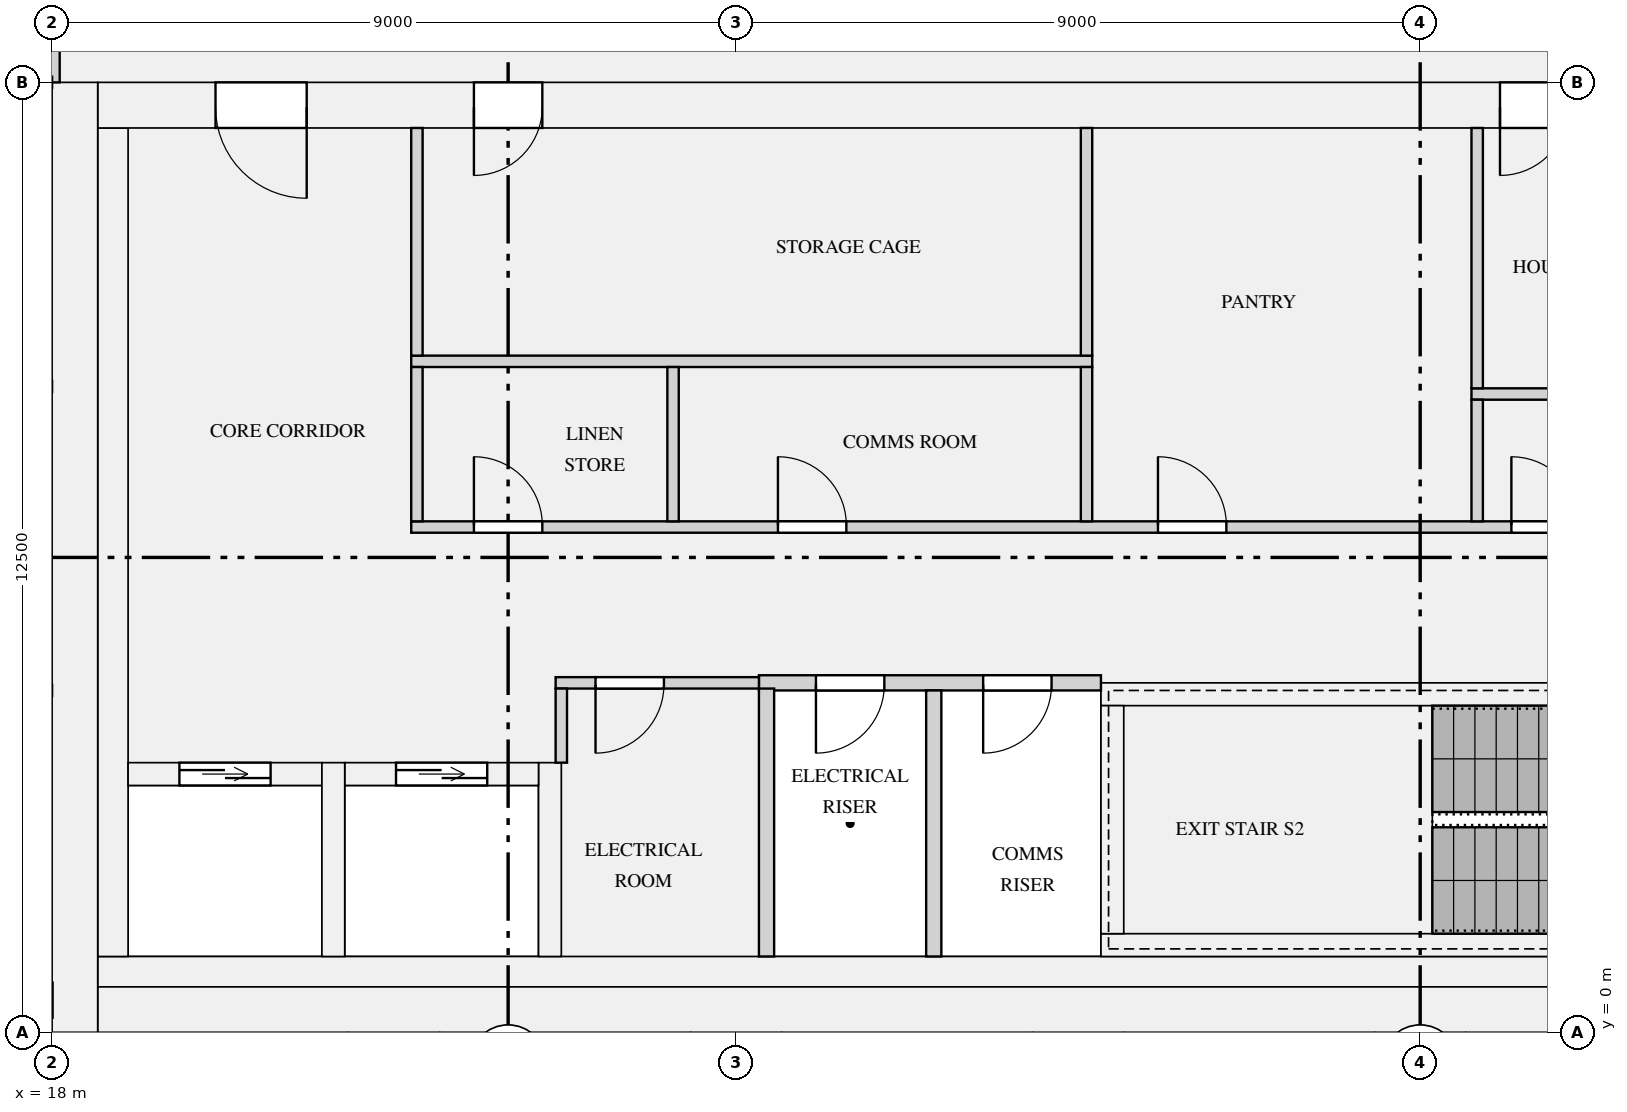
"""IFC4 building model, lengths in metres.
Left out: names, types, materials, properties, quantities, classifications, styles, units other than length and angle.
Written with IfcOpenShell. Run it as: python <this file> out.ifc"""

import sys

from ifc_helpers import new_model, si_unit, direction, frame, frame_2d, origin, place, context, subcontext, project, spatial, rectangle, extrude, element, fill, save


model = new_model("IFC4")
c1 = context("Model", 3, precision=1e-05, world=origin(), true_north=direction((0.0, 1.0)))
c2 = subcontext(c1, "Body", "Model", "MODEL_VIEW")
j1 = project(units=[si_unit("LENGTHUNIT", "METRE"), si_unit("PLANEANGLEUNIT", "RADIAN")], contexts=[c1])
p1 = place(None, origin())
s1 = spatial("IfcSite", under=j1, at=p1, CompositionType="ELEMENT")
p2 = place(p1, origin())
s2 = spatial("IfcBuilding", under=s1, at=p2, CompositionType="ELEMENT")
p3 = place(p2, frame((0.0, 0.0, 198.0)))
s3 = spatial("IfcBuildingStorey", under=s2, at=p3, CompositionType="ELEMENT", Elevation=198.0)
p4 = place(p3, frame((18.3, 0.0, 0.0), z_axis=(0.0, 0.0, 1.0), x_axis=(0.0, 1.0, 0.0)))
e1 = element("IfcWall", 1, at=p4, inside=s3, PredefinedType="SHEAR", context=c2, shape_type="SweptSolid", body=[
    extrude(rectangle(XDim=12.5, YDim=0.6, at=frame_2d((6.25, 0.0))), origin(), (0.0, 0.0, 1.0), 3.15),
])
p5 = place(p3, frame((18.6, 0.3, 0.0), z_axis=(0.0, 0.0, 1.0), x_axis=(1.0, 0.0, 0.0)))
e2 = element("IfcWall", 2, at=p5, inside=s3, PredefinedType="SHEAR", context=c2, shape_type="SweptSolid", body=[
    extrude(rectangle(XDim=34.8, YDim=0.6, at=frame_2d((17.4, 0.0))), origin(), (0.0, 0.0, 1.0), 3.15),
])
p6 = place(p3, frame((18.6, 12.2, 0.0), z_axis=(0.0, 0.0, 1.0), x_axis=(1.0, 0.0, 0.0)))
e3 = element("IfcWall", 3, at=p6, inside=s3, PredefinedType="SHEAR", context=c2, shape_type="SweptSolid", body=[
    extrude(rectangle(XDim=34.8, YDim=0.6, at=frame_2d((17.4, 0.0))), origin(), (0.0, 0.0, 1.0), 3.15),
])
p7 = place(p6, frame((24.575, 0.0, 0.0)))
e4 = element("IfcOpeningElement", 4, at=p7, cuts=e3, PredefinedType="OPENING", context=c2, shape_type="SweptSolid", body=[
    extrude(rectangle(XDim=1.1, YDim=2.1, at=frame_2d((0.55, 1.05))), frame((0.0, 0.31, 0.0), z_axis=(0.0, -1.0, 0.0), x_axis=(1.0, 0.0, 0.0)), (0.0, 0.0, 1.0), 0.62),
])
p8 = place(p6, frame((26.825, 0.0, 0.0)))
e5 = element("IfcOpeningElement", 5, at=p8, cuts=e3, PredefinedType="OPENING", context=c2, shape_type="SweptSolid", body=[
    extrude(rectangle(XDim=1.1, YDim=2.1, at=frame_2d((0.55, 1.05))), frame((0.0, 0.31, 0.0), z_axis=(0.0, -1.0, 0.0), x_axis=(1.0, 0.0, 0.0)), (0.0, 0.0, 1.0), 0.62),
])
p9 = place(p6, frame((29.075, 0.0, 0.0)))
e6 = element("IfcOpeningElement", 6, at=p9, cuts=e3, PredefinedType="OPENING", context=c2, shape_type="SweptSolid", body=[
    extrude(rectangle(XDim=1.1, YDim=2.1, at=frame_2d((0.55, 1.05))), frame((0.0, 0.31, 0.0), z_axis=(0.0, -1.0, 0.0), x_axis=(1.0, 0.0, 0.0)), (0.0, 0.0, 1.0), 0.62),
])
p10 = place(p6, frame((4.95, 0.0, 0.0)))
e7 = element("IfcOpeningElement", 7, at=p10, cuts=e3, PredefinedType="OPENING", context=c2, shape_type="SweptSolid", body=[
    extrude(rectangle(XDim=0.9, YDim=2.1, at=frame_2d((0.45, 1.05))), frame((0.0, 0.31, 0.0), z_axis=(0.0, -1.0, 0.0), x_axis=(1.0, 0.0, 0.0)), (0.0, 0.0, 1.0), 0.62),
])
p11 = place(p6, frame((18.45, 0.0, 0.0)))
e8 = element("IfcOpeningElement", 8, at=p11, cuts=e3, PredefinedType="OPENING", context=c2, shape_type="SweptSolid", body=[
    extrude(rectangle(XDim=0.9, YDim=2.1, at=frame_2d((0.45, 1.05))), frame((0.0, 0.31, 0.0), z_axis=(0.0, -1.0, 0.0), x_axis=(1.0, 0.0, 0.0)), (0.0, 0.0, 1.0), 0.62),
])
p12 = place(p6, frame((1.55, 0.0, 0.0)))
e9 = element("IfcOpeningElement", 9, at=p12, cuts=e3, PredefinedType="OPENING", context=c2, shape_type="SweptSolid", body=[
    extrude(rectangle(XDim=1.2, YDim=2.1, at=frame_2d((0.6, 1.05))), frame((0.0, 0.31, 0.0), z_axis=(0.0, -1.0, 0.0), x_axis=(1.0, 0.0, 0.0)), (0.0, 0.0, 1.0), 0.62),
])
p13 = place(p6, frame((32.05, 0.0, 0.0)))
e10 = element("IfcOpeningElement", 10, at=p13, cuts=e3, PredefinedType="OPENING", context=c2, shape_type="SweptSolid", body=[
    extrude(rectangle(XDim=1.2, YDim=2.1, at=frame_2d((0.6, 1.05))), frame((0.0, 0.31, 0.0), z_axis=(0.0, -1.0, 0.0), x_axis=(1.0, 0.0, 0.0)), (0.0, 0.0, 1.0), 0.62),
])
p14 = place(p3, frame((18.8, 1.0, 0.0), z_axis=(0.0, 0.0, 1.0), x_axis=(0.0, 1.0, 0.0)))
e11 = element("IfcWall", 11, at=p14, inside=s3, PredefinedType="SHEAR", context=c2, shape_type="SweptSolid", body=[
    extrude(rectangle(XDim=10.9, YDim=0.4, at=frame_2d((5.45, 0.0))), origin(), (0.0, 0.0, 1.0), 3.15),
])
p15 = place(p3, frame((18.6, 0.8, 0.0), z_axis=(0.0, 0.0, 1.0), x_axis=(1.0, 0.0, 0.0)))
e12 = element("IfcWall", 12, at=p15, inside=s3, PredefinedType="SHEAR", context=c2, shape_type="SweptSolid", body=[
    extrude(rectangle(XDim=34.8, YDim=0.4, at=frame_2d((17.4, 0.0))), origin(), (0.0, 0.0, 1.0), 3.15),
])
p16 = place(p3, frame((19.0, 3.4, 0.0), z_axis=(0.0, 0.0, 1.0), x_axis=(1.0, 0.0, 0.0)))
e13 = element("IfcWall", 13, at=p16, inside=s3, PredefinedType="SHEAR", context=c2, shape_type="SweptSolid", body=[
    extrude(rectangle(XDim=2.55, YDim=0.3, at=frame_2d((1.275, 0.0))), origin(), (0.0, 0.0, 1.0), 3.15),
])
p17 = place(p16, frame((0.675, 0.0, 0.0)))
e14 = element("IfcOpeningElement", 14, at=p17, cuts=e13, PredefinedType="OPENING", context=c2, shape_type="SweptSolid", body=[
    extrude(rectangle(XDim=1.2, YDim=2.1, at=frame_2d((0.6, 1.05))), frame((0.0, 0.16, 0.0), z_axis=(0.0, -1.0, 0.0), x_axis=(1.0, 0.0, 0.0)), (0.0, 0.0, 1.0), 0.32),
])
p18 = place(p3, frame((21.85, 3.4, 0.0), z_axis=(0.0, 0.0, 1.0), x_axis=(1.0, 0.0, 0.0)))
e15 = element("IfcWall", 15, at=p18, inside=s3, PredefinedType="SHEAR", context=c2, shape_type="SweptSolid", body=[
    extrude(rectangle(XDim=2.55, YDim=0.3, at=frame_2d((1.275, 0.0))), origin(), (0.0, 0.0, 1.0), 3.15),
])
p19 = place(p18, frame((0.675, 0.0, 0.0)))
e16 = element("IfcOpeningElement", 16, at=p19, cuts=e15, PredefinedType="OPENING", context=c2, shape_type="SweptSolid", body=[
    extrude(rectangle(XDim=1.2, YDim=2.1, at=frame_2d((0.6, 1.05))), frame((0.0, 0.16, 0.0), z_axis=(0.0, -1.0, 0.0), x_axis=(1.0, 0.0, 0.0)), (0.0, 0.0, 1.0), 0.32),
])
for number, where, z_axis, x_axis in (
    (17, (21.7, 1.0, 0.0), (0.0, 0.0, 1.0), (0.0, 1.0, 0.0)),
    (18, (24.55, 1.0, 0.0), (0.0, 0.0, 1.0), (0.0, 1.0, 0.0)),
):
    element("IfcWall", number, at=place(p3, frame(where, z_axis=z_axis, x_axis=x_axis)), inside=s3, PredefinedType="SHEAR", context=c2, shape_type="SweptSolid", body=[
        extrude(rectangle(XDim=2.55, YDim=0.3, at=frame_2d((1.275, 0.0))), origin(), (0.0, 0.0, 1.0), 3.15),
    ])
p20 = place(p3, frame((31.8, 1.15, 0.0), z_axis=(0.0, 0.0, 1.0), x_axis=(1.0, 0.0, 0.0)))
e19 = element("IfcWall", 19, at=p20, inside=s3, PredefinedType="SHEAR", context=c2, shape_type="SweptSolid", body=[
    extrude(rectangle(XDim=8.4, YDim=0.3, at=frame_2d((4.2, 0.0))), origin(), (0.0, 0.0, 1.0), 3.15),
])
p21 = place(p3, frame((31.8, 4.45, 0.0), z_axis=(0.0, 0.0, 1.0), x_axis=(1.0, 0.0, 0.0)))
e20 = element("IfcWall", 20, at=p21, inside=s3, PredefinedType="SHEAR", context=c2, shape_type="SweptSolid", body=[
    extrude(rectangle(XDim=8.4, YDim=0.3, at=frame_2d((4.2, 0.0))), origin(), (0.0, 0.0, 1.0), 3.15),
])
p22 = place(p21, frame((6.8, 0.0, 0.0)))
e21 = element("IfcOpeningElement", 21, at=p22, cuts=e20, PredefinedType="OPENING", context=c2, shape_type="SweptSolid", body=[
    extrude(rectangle(XDim=1.1, YDim=2.1, at=frame_2d((0.55, 1.05))), frame((0.0, 0.16, 0.0), z_axis=(0.0, -1.0, 0.0), x_axis=(1.0, 0.0, 0.0)), (0.0, 0.0, 1.0), 0.32),
])
p23 = place(p3, frame((31.95, 1.3, 0.0), z_axis=(0.0, 0.0, 1.0), x_axis=(0.0, 1.0, 0.0)))
e22 = element("IfcWall", 22, at=p23, inside=s3, PredefinedType="SHEAR", context=c2, shape_type="SweptSolid", body=[
    extrude(rectangle(XDim=3.0, YDim=0.3, at=frame_2d((1.5, 0.0))), origin(), (0.0, 0.0, 1.0), 3.15),
])
p24 = place(p3, frame((27.3, 4.6, 0.0), z_axis=(0.0, 0.0, 1.0), x_axis=(1.0, 0.0, 0.0)))
e23 = element("IfcWall", 23, at=p24, inside=s3, PredefinedType="PARTITIONING", context=c2, shape_type="SweptSolid", body=[
    extrude(rectangle(XDim=4.5, YDim=0.2, at=frame_2d((2.25, 0.0))), origin(), (0.0, 0.0, 1.0), 2.83),
])
p25 = place(p24, frame((0.75, 0.0, 0.0)))
e24 = element("IfcOpeningElement", 24, at=p25, cuts=e23, PredefinedType="OPENING", context=c2, shape_type="SweptSolid", body=[
    extrude(rectangle(XDim=0.9, YDim=2.1, at=frame_2d((0.45, 1.05))), frame((0.0, 0.11, 0.0), z_axis=(0.0, -1.0, 0.0), x_axis=(1.0, 0.0, 0.0)), (0.0, 0.0, 1.0), 0.22),
])
p26 = place(p24, frame((2.95, 0.0, 0.0)))
e25 = element("IfcOpeningElement", 25, at=p26, cuts=e23, PredefinedType="OPENING", context=c2, shape_type="SweptSolid", body=[
    extrude(rectangle(XDim=0.9, YDim=2.1, at=frame_2d((0.45, 1.05))), frame((0.0, 0.11, 0.0), z_axis=(0.0, -1.0, 0.0), x_axis=(1.0, 0.0, 0.0)), (0.0, 0.0, 1.0), 0.22),
])
p27 = place(p3, frame((24.625, 4.6, 0.0), z_axis=(0.0, 0.0, 1.0), x_axis=(1.0, 0.0, 0.0)))
e26 = element("IfcWall", 26, at=p27, inside=s3, PredefinedType="PARTITIONING", context=c2, shape_type="SweptSolid", body=[
    extrude(rectangle(XDim=2.675, YDim=0.15, at=frame_2d((1.337, 0.0))), origin(), (0.0, 0.0, 1.0), 2.83),
])
p28 = place(p27, frame((0.525, 0.0, 0.0)))
e27 = element("IfcOpeningElement", 27, at=p28, cuts=e26, PredefinedType="OPENING", context=c2, shape_type="SweptSolid", body=[
    extrude(rectangle(XDim=0.9, YDim=2.1, at=frame_2d((0.45, 1.05))), frame((0.0, 0.085, 0.0), z_axis=(0.0, -1.0, 0.0), x_axis=(1.0, 0.0, 0.0)), (0.0, 0.0, 1.0), 0.17),
])
p29 = place(p3, frame((22.725, 6.65, 0.0), z_axis=(0.0, 0.0, 1.0), x_axis=(1.0, 0.0, 0.0)))
e28 = element("IfcWall", 28, at=p29, inside=s3, PredefinedType="PARTITIONING", context=c2, shape_type="SweptSolid", body=[
    extrude(rectangle(XDim=19.8, YDim=0.15, at=frame_2d((9.9, 0.0))), origin(), (0.0, 0.0, 1.0), 2.83),
])
p30 = place(p29, frame((0.825, 0.0, 0.0)))
e29 = element("IfcOpeningElement", 29, at=p30, cuts=e28, PredefinedType="OPENING", context=c2, shape_type="SweptSolid", body=[
    extrude(rectangle(XDim=0.9, YDim=2.1, at=frame_2d((0.45, 1.05))), frame((0.0, 0.085, 0.0), z_axis=(0.0, -1.0, 0.0), x_axis=(1.0, 0.0, 0.0)), (0.0, 0.0, 1.0), 0.17),
])
p31 = place(p29, frame((4.825, 0.0, 0.0)))
e30 = element("IfcOpeningElement", 30, at=p31, cuts=e28, PredefinedType="OPENING", context=c2, shape_type="SweptSolid", body=[
    extrude(rectangle(XDim=0.9, YDim=2.1, at=frame_2d((0.45, 1.05))), frame((0.0, 0.085, 0.0), z_axis=(0.0, -1.0, 0.0), x_axis=(1.0, 0.0, 0.0)), (0.0, 0.0, 1.0), 0.17),
])
p32 = place(p29, frame((9.825, 0.0, 0.0)))
e31 = element("IfcOpeningElement", 31, at=p32, cuts=e28, PredefinedType="OPENING", context=c2, shape_type="SweptSolid", body=[
    extrude(rectangle(XDim=0.9, YDim=2.1, at=frame_2d((0.45, 1.05))), frame((0.0, 0.085, 0.0), z_axis=(0.0, -1.0, 0.0), x_axis=(1.0, 0.0, 0.0)), (0.0, 0.0, 1.0), 0.17),
])
p33 = place(p29, frame((14.475, 0.0, 0.0)))
e32 = element("IfcOpeningElement", 32, at=p33, cuts=e28, PredefinedType="OPENING", context=c2, shape_type="SweptSolid", body=[
    extrude(rectangle(XDim=0.9, YDim=2.1, at=frame_2d((0.45, 1.05))), frame((0.0, 0.085, 0.0), z_axis=(0.0, -1.0, 0.0), x_axis=(1.0, 0.0, 0.0)), (0.0, 0.0, 1.0), 0.17),
])
p34 = place(p3, frame((36.675, 8.4, 0.0), z_axis=(0.0, 0.0, 1.0), x_axis=(1.0, 0.0, 0.0)))
e33 = element("IfcWall", 33, at=p34, inside=s3, PredefinedType="PARTITIONING", context=c2, shape_type="SweptSolid", body=[
    extrude(rectangle(XDim=5.775, YDim=0.15, at=frame_2d((2.887, 0.0))), origin(), (0.0, 0.0, 1.0), 2.83),
])
p35 = place(p3, frame((22.725, 8.83, 0.0), z_axis=(0.0, 0.0, 1.0), x_axis=(1.0, 0.0, 0.0)))
e34 = element("IfcWall", 34, at=p35, inside=s3, PredefinedType="PARTITIONING", context=c2, shape_type="SweptSolid", body=[
    extrude(rectangle(XDim=8.96, YDim=0.15, at=frame_2d((4.48, 0.0))), origin(), (0.0, 0.0, 1.0), 2.83),
])
p36 = place(p3, frame((27.4, 1.0, 0.0), z_axis=(0.0, 0.0, 1.0), x_axis=(0.0, 1.0, 0.0)))
e35 = element("IfcWall", 35, at=p36, inside=s3, PredefinedType="PARTITIONING", context=c2, shape_type="SweptSolid", body=[
    extrude(rectangle(XDim=3.525, YDim=0.2, at=frame_2d((1.762, 0.0))), origin(), (0.0, 0.0, 1.0), 2.83),
])
p37 = place(p3, frame((29.6, 1.0, 0.0), z_axis=(0.0, 0.0, 1.0), x_axis=(0.0, 1.0, 0.0)))
e36 = element("IfcWall", 36, at=p37, inside=s3, PredefinedType="PARTITIONING", context=c2, shape_type="SweptSolid", body=[
    extrude(rectangle(XDim=3.5, YDim=0.2, at=frame_2d((1.75, 0.0))), origin(), (0.0, 0.0, 1.0), 2.83),
])
p38 = place(p3, frame((24.7, 3.55, 0.0), z_axis=(0.0, 0.0, 1.0), x_axis=(0.0, 1.0, 0.0)))
e37 = element("IfcWall", 37, at=p38, inside=s3, PredefinedType="PARTITIONING", context=c2, shape_type="SweptSolid", body=[
    extrude(rectangle(XDim=0.975, YDim=0.15, at=frame_2d((0.487, 0.0))), origin(), (0.0, 0.0, 1.0), 2.83),
])
for number, where, z_axis, x_axis in (
    (38, (22.8, 6.725, 0.0), (0.0, 0.0, 1.0), (0.0, 1.0, 0.0)),
    (39, (26.17, 6.725, 0.0), (0.0, 0.0, 1.0), (0.0, 1.0, 0.0)),
    (40, (31.61, 6.725, 0.0), (0.0, 0.0, 1.0), (0.0, 1.0, 0.0)),
):
    element("IfcWall", number, at=place(p3, frame(where, z_axis=z_axis, x_axis=x_axis)), inside=s3, PredefinedType="PARTITIONING", context=c2, shape_type="SweptSolid", body=[
        extrude(rectangle(XDim=2.03, YDim=0.15, at=frame_2d((1.015, 0.0))), origin(), (0.0, 0.0, 1.0), 2.83),
    ])
p39 = place(p3, frame((36.75, 6.725, 0.0), z_axis=(0.0, 0.0, 1.0), x_axis=(0.0, 1.0, 0.0)))
e41 = element("IfcWall", 41, at=p39, inside=s3, PredefinedType="PARTITIONING", context=c2, shape_type="SweptSolid", body=[
    extrude(rectangle(XDim=1.6, YDim=0.15, at=frame_2d((0.8, 0.0))), origin(), (0.0, 0.0, 1.0), 2.83),
])
p40 = place(p3, frame((36.75, 8.475, 0.0), z_axis=(0.0, 0.0, 1.0), x_axis=(0.0, 1.0, 0.0)))
e42 = element("IfcWall", 42, at=p40, inside=s3, PredefinedType="PARTITIONING", context=c2, shape_type="SweptSolid", body=[
    extrude(rectangle(XDim=3.425, YDim=0.15, at=frame_2d((1.712, 0.0))), origin(), (0.0, 0.0, 1.0), 2.83),
])
for number, where, z_axis, x_axis in (
    (43, (22.8, 8.905, 0.0), (0.0, 0.0, 1.0), (0.0, 1.0, 0.0)),
    (44, (31.61, 8.905, 0.0), (0.0, 0.0, 1.0), (0.0, 1.0, 0.0)),
):
    element("IfcWall", number, at=place(p3, frame(where, z_axis=z_axis, x_axis=x_axis)), inside=s3, PredefinedType="PARTITIONING", context=c2, shape_type="SweptSolid", body=[
        extrude(rectangle(XDim=2.995, YDim=0.15, at=frame_2d((1.498, 0.0))), origin(), (0.0, 0.0, 1.0), 2.83),
    ])
p41 = place(p3, frame((18.0, 12.5, 0.0), z_axis=(0.0, 0.0, 1.0), x_axis=(0.0, 1.0, 0.0)))
e45 = element("IfcWall", 45, at=p41, inside=s3, PredefinedType="PARTITIONING", context=c2, shape_type="SweptSolid", body=[
    extrude(rectangle(XDim=3.4, YDim=0.2, at=frame_2d((1.7, 0.0))), origin(), (0.0, 0.0, 1.0), 2.83),
])
p42 = place(p3, frame((13.925, 8.5, 0.0), z_axis=(0.0, 0.0, 1.0), x_axis=(1.0, 0.0, 0.0)))
e46 = element("IfcWall", 46, at=p42, inside=s3, PredefinedType="PARTITIONING", context=c2, shape_type="SweptSolid", body=[
    extrude(rectangle(XDim=4.075, YDim=0.15, at=frame_2d((2.038, 0.0))), origin(), (0.0, 0.0, 1.0), 2.83),
])
p43 = place(p17, origin())
e47 = element("IfcDoor", 47, at=p43, inside=s3, OperationType="DOUBLE_DOOR_SLIDING", PredefinedType="DOOR", context=c2, shape_type="SweptSolid", body=[
    extrude(rectangle(XDim=1.2, YDim=2.1, at=frame_2d((0.6, 1.05))), frame((0.0, 0.025, 0.0), z_axis=(0.0, -1.0, 0.0), x_axis=(1.0, 0.0, 0.0)), (0.0, 0.0, 1.0), 0.05),
])
fill(e14, e47)
p44 = place(p19, origin())
e48 = element("IfcDoor", 48, at=p44, inside=s3, OperationType="DOUBLE_DOOR_SLIDING", PredefinedType="DOOR", context=c2, shape_type="SweptSolid", body=[
    extrude(rectangle(XDim=1.2, YDim=2.1, at=frame_2d((0.6, 1.05))), frame((0.0, 0.025, 0.0), z_axis=(0.0, -1.0, 0.0), x_axis=(1.0, 0.0, 0.0)), (0.0, 0.0, 1.0), 0.05),
])
fill(e16, e48)
p45 = place(p28, frame((0.9, 0.0, 0.0), z_axis=(0.0, 0.0, 1.0), x_axis=(-1.0, 0.0, 0.0)))
e49 = element("IfcDoor", 49, at=p45, inside=s3, OperationType="SINGLE_SWING_RIGHT", PredefinedType="DOOR", context=c2, shape_type="SweptSolid", body=[
    extrude(rectangle(XDim=0.9, YDim=2.1, at=frame_2d((0.45, 1.05))), frame((0.0, 0.025, 0.0), z_axis=(0.0, -1.0, 0.0), x_axis=(1.0, 0.0, 0.0)), (0.0, 0.0, 1.0), 0.05),
])
fill(e27, e49)
p46 = place(p30, origin())
e50 = element("IfcDoor", 50, at=p46, inside=s3, OperationType="SINGLE_SWING_LEFT", PredefinedType="DOOR", context=c2, shape_type="SweptSolid", body=[
    extrude(rectangle(XDim=0.9, YDim=2.1, at=frame_2d((0.45, 1.05))), frame((0.0, 0.025, 0.0), z_axis=(0.0, -1.0, 0.0), x_axis=(1.0, 0.0, 0.0)), (0.0, 0.0, 1.0), 0.05),
])
fill(e29, e50)
p47 = place(p31, origin())
e51 = element("IfcDoor", 51, at=p47, inside=s3, OperationType="SINGLE_SWING_LEFT", PredefinedType="DOOR", context=c2, shape_type="SweptSolid", body=[
    extrude(rectangle(XDim=0.9, YDim=2.1, at=frame_2d((0.45, 1.05))), frame((0.0, 0.025, 0.0), z_axis=(0.0, -1.0, 0.0), x_axis=(1.0, 0.0, 0.0)), (0.0, 0.0, 1.0), 0.05),
])
fill(e30, e51)
p48 = place(p32, origin())
e52 = element("IfcDoor", 52, at=p48, inside=s3, OperationType="SINGLE_SWING_LEFT", PredefinedType="DOOR", context=c2, shape_type="SweptSolid", body=[
    extrude(rectangle(XDim=0.9, YDim=2.1, at=frame_2d((0.45, 1.05))), frame((0.0, 0.025, 0.0), z_axis=(0.0, -1.0, 0.0), x_axis=(1.0, 0.0, 0.0)), (0.0, 0.0, 1.0), 0.05),
])
fill(e31, e52)
p49 = place(p10, frame((0.9, 0.0, 0.0), z_axis=(0.0, 0.0, 1.0), x_axis=(-1.0, 0.0, 0.0)))
e53 = element("IfcDoor", 53, at=p49, inside=s3, OperationType="SINGLE_SWING_RIGHT", PredefinedType="DOOR", context=c2, shape_type="SweptSolid", body=[
    extrude(rectangle(XDim=0.9, YDim=2.1, at=frame_2d((0.45, 1.05))), frame((0.0, 0.025, 0.0), z_axis=(0.0, -1.0, 0.0), x_axis=(1.0, 0.0, 0.0)), (0.0, 0.0, 1.0), 0.05),
])
fill(e7, e53)
p50 = place(p33, origin())
e54 = element("IfcDoor", 54, at=p50, inside=s3, OperationType="SINGLE_SWING_LEFT", PredefinedType="DOOR", context=c2, shape_type="SweptSolid", body=[
    extrude(rectangle(XDim=0.9, YDim=2.1, at=frame_2d((0.45, 1.05))), frame((0.0, 0.025, 0.0), z_axis=(0.0, -1.0, 0.0), x_axis=(1.0, 0.0, 0.0)), (0.0, 0.0, 1.0), 0.05),
])
fill(e32, e54)
p51 = place(p11, frame((0.9, 0.0, 0.0), z_axis=(0.0, 0.0, 1.0), x_axis=(-1.0, 0.0, 0.0)))
e55 = element("IfcDoor", 55, at=p51, inside=s3, OperationType="SINGLE_SWING_RIGHT", PredefinedType="DOOR", context=c2, shape_type="SweptSolid", body=[
    extrude(rectangle(XDim=0.9, YDim=2.1, at=frame_2d((0.45, 1.05))), frame((0.0, 0.025, 0.0), z_axis=(0.0, -1.0, 0.0), x_axis=(1.0, 0.0, 0.0)), (0.0, 0.0, 1.0), 0.05),
])
fill(e8, e55)
p52 = place(p25, frame((0.9, 0.0, 0.0), z_axis=(0.0, 0.0, 1.0), x_axis=(-1.0, 0.0, 0.0)))
e56 = element("IfcDoor", 56, at=p52, inside=s3, OperationType="SINGLE_SWING_RIGHT", PredefinedType="DOOR", context=c2, shape_type="SweptSolid", body=[
    extrude(rectangle(XDim=0.9, YDim=2.1, at=frame_2d((0.45, 1.05))), frame((0.0, 0.025, 0.0), z_axis=(0.0, -1.0, 0.0), x_axis=(1.0, 0.0, 0.0)), (0.0, 0.0, 1.0), 0.05),
])
fill(e24, e56)
p53 = place(p26, frame((0.9, 0.0, 0.0), z_axis=(0.0, 0.0, 1.0), x_axis=(-1.0, 0.0, 0.0)))
e57 = element("IfcDoor", 57, at=p53, inside=s3, OperationType="SINGLE_SWING_RIGHT", PredefinedType="DOOR", context=c2, shape_type="SweptSolid", body=[
    extrude(rectangle(XDim=0.9, YDim=2.1, at=frame_2d((0.45, 1.05))), frame((0.0, 0.025, 0.0), z_axis=(0.0, -1.0, 0.0), x_axis=(1.0, 0.0, 0.0)), (0.0, 0.0, 1.0), 0.05),
])
fill(e25, e57)
p54 = place(p12, frame((1.2, 0.0, 0.0), z_axis=(0.0, 0.0, 1.0), x_axis=(-1.0, 0.0, 0.0)))
e58 = element("IfcDoor", 58, at=p54, inside=s3, OperationType="SINGLE_SWING_LEFT", PredefinedType="DOOR", context=c2, shape_type="SweptSolid", body=[
    extrude(rectangle(XDim=1.2, YDim=2.1, at=frame_2d((0.6, 1.05))), frame((0.0, 0.025, 0.0), z_axis=(0.0, -1.0, 0.0), x_axis=(1.0, 0.0, 0.0)), (0.0, 0.0, 1.0), 0.05),
])
fill(e9, e58)
save(model, sys.argv[1])
